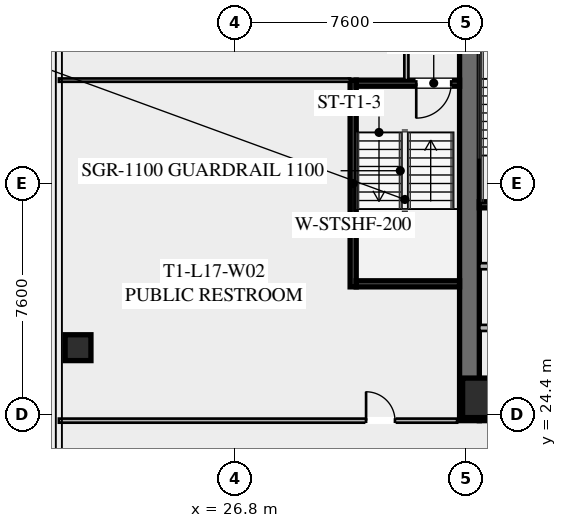
"""IFC4 building model, lengths in metres.
Left out: names, types, materials, properties, quantities, classifications, styles, units other than length and angle.
Written with IfcOpenShell. Run it as: python <this file> out.ifc"""

import sys

from ifc_helpers import new_model, si_unit, direction, frame, frame_2d, origin, origin_2d, place, context, subcontext, project, spatial, rectangle, hollow_rectangle, extrude, element, fill, save


model = new_model("IFC4")
c1 = context("Model", 3, precision=1e-05, world=origin(), true_north=direction((0.0, 1.0)))
c2 = subcontext(c1, "Body", "Model", "MODEL_VIEW")
j1 = project(units=[si_unit("LENGTHUNIT", "METRE"), si_unit("PLANEANGLEUNIT", "RADIAN")], contexts=[c1])
p1 = place(None, origin())
s1 = spatial("IfcSite", under=j1, at=p1, CompositionType="ELEMENT")
p2 = place(p1, origin())
s2 = spatial("IfcBuilding", under=s1, at=p2, CompositionType="ELEMENT")
p3 = place(p2, frame((0.0, 0.0, 67.2)))
s3 = spatial("IfcBuildingStorey", under=s2, at=p3, CompositionType="ELEMENT", Elevation=67.2)
p4 = place(p3, frame((34.525, 24.2, 0.0), z_axis=(0.0, 0.0, 1.0), x_axis=(0.0, 1.0, 0.0)))
e1 = element("IfcWall", 1, at=p4, inside=s3, PredefinedType="SHEAR", context=c2, shape_type="SweptSolid", body=[
    extrude(rectangle(XDim=15.6, YDim=0.65, at=frame_2d((7.8, 0.0))), origin(), (0.0, 0.0, 1.0), 3.55),
])
p5 = place(p3, frame((49.15, 24.525, 0.0), z_axis=(0.0, 0.0, 1.0), x_axis=(-1.0, 0.0, 0.0)))
e2 = element("IfcWall", 2, at=p5, inside=s3, PredefinedType="SHEAR", context=c2, shape_type="SweptSolid", body=[
    extrude(rectangle(XDim=14.3, YDim=0.65, at=frame_2d((7.15, 0.0))), origin(), (0.0, 0.0, 1.0), 3.55),
])
p6 = place(p5, frame((8.85, 0.0, 0.0)))
e3 = element("IfcOpeningElement", 3, at=p6, cuts=e2, PredefinedType="OPENING", context=c2, shape_type="SweptSolid", body=[
    extrude(rectangle(XDim=1.25, YDim=2.25, at=frame_2d((0.625, 1.125))), frame((0.0, 0.335, 0.0), z_axis=(0.0, -1.0, 0.0), x_axis=(1.0, 0.0, 0.0)), (0.0, 0.0, 1.0), 0.67),
])
p7 = place(p5, frame((3.8, 0.0, 0.0)))
e4 = element("IfcOpeningElement", 4, at=p7, cuts=e2, PredefinedType="OPENING", context=c2, shape_type="SweptSolid", body=[
    extrude(rectangle(XDim=1.25, YDim=2.25, at=frame_2d((0.625, 1.125))), frame((0.0, 0.335, 0.0), z_axis=(0.0, -1.0, 0.0), x_axis=(1.0, 0.0, 0.0)), (0.0, 0.0, 1.0), 0.67),
])
p8 = place(p3, frame((34.95, 24.95, 0.0), z_axis=(0.0, 0.0, 1.0), x_axis=(1.0, 0.0, 0.0)))
e5 = element("IfcColumn", 5, at=p8, inside=s3, PredefinedType="COLUMN", context=c2, shape_type="SweptSolid", body=[
    extrude(hollow_rectangle(XDim=1.3, YDim=1.3, WallThickness=0.05, at=origin_2d()), origin(), (0.0, 0.0, 1.0), 3.35),
])
p9 = place(p3, frame((21.65, 26.6, -0.195), z_axis=(0.0, 0.0, 1.0), x_axis=(1.0, 0.0, 0.0)))
e6 = element("IfcColumn", 6, at=p9, inside=s3, PredefinedType="COLUMN", context=c2, shape_type="SweptSolid", body=[
    extrude(hollow_rectangle(XDim=0.85, YDim=0.85, WallThickness=0.035, at=origin_2d()), origin(), (0.0, 0.0, 1.0), 3.545),
])
p10 = place(p3, frame((34.85, 31.3, 0.0), z_axis=(0.0, 0.0, 1.0), x_axis=(1.0, 0.0, 0.0)))
e7 = element("IfcWall", 7, at=p10, inside=s3, PredefinedType="SHEAR", context=c2, shape_type="SweptSolid", body=[
    extrude(rectangle(XDim=3.45, YDim=0.2, at=frame_2d((1.725, 0.0))), origin(), (0.0, 0.0, 1.0), 3.35),
])
for number, where, z_axis, x_axis in (
    (8, (34.85, 27.25, 0.0), (0.0, 0.0, 1.0), (1.0, 0.0, 0.0)),
    (9, (34.85, 29.28, 0.0), (0.0, 0.0, 1.0), (1.0, 0.0, 0.0)),
):
    element("IfcWall", number, at=place(p3, frame(where, z_axis=z_axis, x_axis=x_axis)), inside=s3, PredefinedType="SOLIDWALL", context=c2, shape_type="SweptSolid", body=[
        extrude(rectangle(XDim=3.1, YDim=0.2, at=frame_2d((1.55, 0.0))), origin(), (0.0, 0.0, 1.0), 3.35),
    ])
p11 = place(p3, frame((30.7, 28.6, 0.0), z_axis=(0.0, 0.0, 1.0), x_axis=(0.0, 1.0, 0.0)))
e10 = element("IfcWall", 10, at=p11, inside=s3, PredefinedType="SHEAR", context=c2, shape_type="SweptSolid", body=[
    extrude(rectangle(XDim=6.8, YDim=0.2, at=frame_2d((3.4, 0.0))), origin(), (0.0, 0.0, 1.0), 3.35),
])
p12 = place(p3, frame((34.2, 35.3, 0.0), z_axis=(0.0, 0.0, 1.0), x_axis=(-1.0, 0.0, 0.0)))
e11 = element("IfcWall", 11, at=p12, inside=s3, PredefinedType="SHEAR", context=c2, shape_type="SweptSolid", body=[
    extrude(rectangle(XDim=3.4, YDim=0.2, at=frame_2d((1.7, 0.0))), origin(), (0.0, 0.0, 1.0), 3.35),
])
p13 = place(p12, frame((0.275, 0.0, 0.0)))
e12 = element("IfcOpeningElement", 12, at=p13, cuts=e11, PredefinedType="OPENING", context=c2, shape_type="SweptSolid", body=[
    extrude(rectangle(XDim=1.15, YDim=2.2, at=frame_2d((0.575, 1.1))), frame((0.0, 0.11, 0.0), z_axis=(0.0, -1.0, 0.0), x_axis=(1.0, 0.0, 0.0)), (0.0, 0.0, 1.0), 0.22),
])
p14 = place(p3, frame((30.8, 28.7, 0.0), z_axis=(0.0, 0.0, 1.0), x_axis=(1.0, 0.0, 0.0)))
e13 = element("IfcWall", 13, at=p14, inside=s3, PredefinedType="SHEAR", context=c2, shape_type="SweptSolid", body=[
    extrude(rectangle(XDim=3.4, YDim=0.2, at=frame_2d((1.7, 0.0))), origin(), (0.0, 0.0, 1.0), 3.35),
])
p15 = place(p3, frame((32.45, 35.4, 0.0), z_axis=(0.0, 0.0, 1.0), x_axis=(0.0, 1.0, 0.0)))
e14 = element("IfcWall", 14, at=p15, inside=s3, PredefinedType="PARTITIONING", context=c2, shape_type="SweptSolid", body=[
    extrude(rectangle(XDim=4.4, YDim=0.135, at=frame_2d((2.2, 0.0))), origin(), (0.0, 0.0, 1.0), 2.703),
])
p16 = place(p3, frame((21.02, 24.2, 0.0), z_axis=(0.0, 0.0, 1.0), x_axis=(1.0, 0.0, 0.0)))
e15 = element("IfcWall", 15, at=p16, inside=s3, PredefinedType="PARTITIONING", context=c2, shape_type="SweptSolid", body=[
    extrude(rectangle(XDim=13.1, YDim=0.135, at=frame_2d((6.55, 0.0))), origin(), (0.0, 0.0, 1.0), 2.703),
])
p17 = place(p16, frame((10.105, 0.0, 0.0)))
e16 = element("IfcOpeningElement", 16, at=p17, cuts=e15, PredefinedType="OPENING", context=c2, shape_type="SweptSolid", body=[
    extrude(rectangle(XDim=0.95, YDim=2.05, at=frame_2d((0.475, 1.025))), frame((0.0, 0.077, 0.0), z_axis=(0.0, -1.0, 0.0), x_axis=(1.0, 0.0, 0.0)), (0.0, 0.0, 1.0), 0.155),
])
p18 = place(p3, frame((30.6, 35.4, 0.0), z_axis=(0.0, 0.0, 1.0), x_axis=(-1.0, 0.0, 0.0)))
e17 = element("IfcWall", 17, at=p18, inside=s3, PredefinedType="PARTITIONING", context=c2, shape_type="SweptSolid", body=[
    extrude(rectangle(XDim=9.58, YDim=0.11, at=frame_2d((4.79, 0.0))), origin(), (0.0, 0.0, 1.0), 2.703),
])
p19 = place(p13, origin())
e18 = element("IfcDoor", 18, at=p19, inside=s3, OperationType="SINGLE_SWING_RIGHT", PredefinedType="DOOR", context=c2, shape_type="SweptSolid", body=[
    extrude(rectangle(XDim=1.15, YDim=2.2, at=frame_2d((0.575, 1.1))), frame((0.0, 0.025, 0.0), z_axis=(0.0, -1.0, 0.0), x_axis=(1.0, 0.0, 0.0)), (0.0, 0.0, 1.0), 0.05),
])
fill(e12, e18)
p20 = place(p17, origin())
e19 = element("IfcDoor", 19, at=p20, inside=s3, OperationType="SINGLE_SWING_LEFT", PredefinedType="DOOR", context=c2, shape_type="SweptSolid", body=[
    extrude(rectangle(XDim=0.95, YDim=2.05, at=frame_2d((0.475, 1.025))), frame((0.0, 0.025, 0.0), z_axis=(0.0, -1.0, 0.0), x_axis=(1.0, 0.0, 0.0)), (0.0, 0.0, 1.0), 0.05),
])
fill(e16, e19)
save(model, sys.argv[1])
